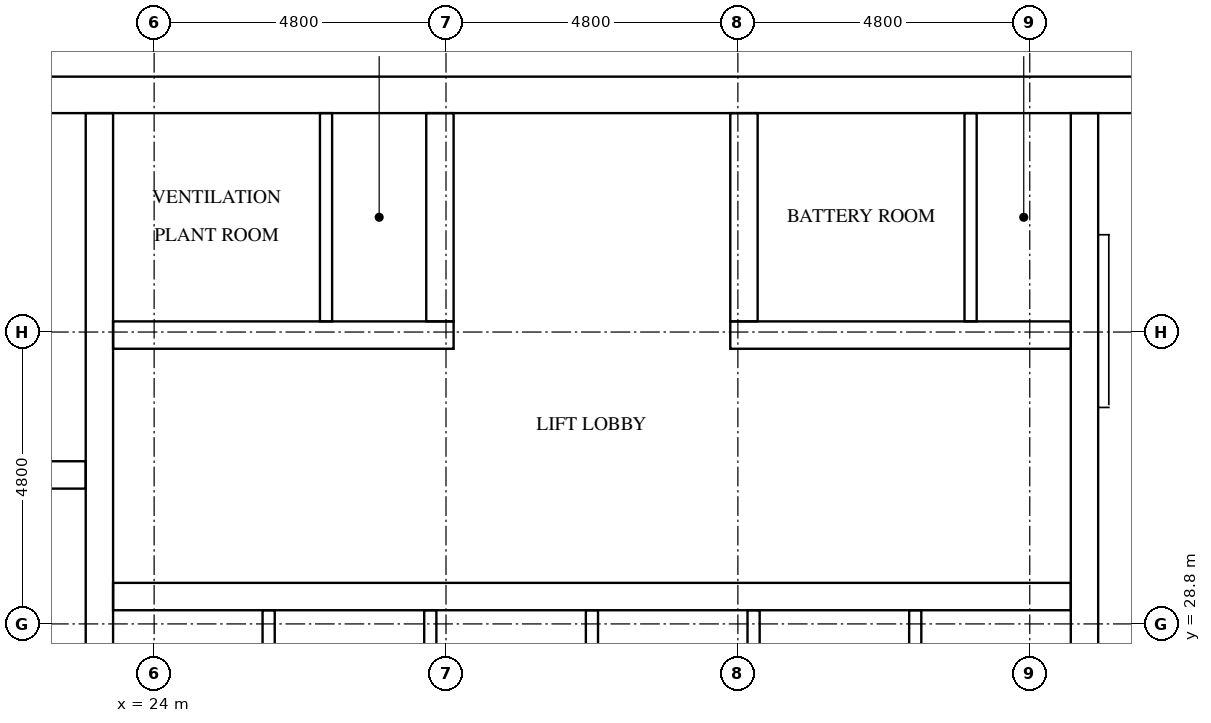
"""IFC4 building model, lengths in metres.
Left out: names, types, materials, properties, quantities, classifications, styles, units other than length and angle.
Written with IfcOpenShell. Run it as: python <this file> out.ifc"""

import sys

from ifc_helpers import new_model, si_unit, direction, frame, frame_2d, origin, place, context, subcontext, project, spatial, rectangle, extrude, element, fill, save


model = new_model("IFC4")
c1 = context("Model", 3, precision=1e-05, world=origin(), true_north=direction((0.0, 1.0)))
c2 = subcontext(c1, "Body", "Model", "MODEL_VIEW")
j1 = project(units=[si_unit("LENGTHUNIT", "METRE"), si_unit("PLANEANGLEUNIT", "RADIAN")], contexts=[c1])
p1 = place(None, origin())
s1 = spatial("IfcSite", under=j1, at=p1, CompositionType="ELEMENT")
p2 = place(p1, origin())
s2 = spatial("IfcBuilding", under=s1, at=p2, CompositionType="ELEMENT")
p3 = place(p2, frame((0.0, 0.0, 249.2)))
s3 = spatial("IfcBuildingStorey", under=s2, at=p3, CompositionType="ELEMENT", Elevation=249.2)
p4 = place(p3, frame((15.0, 37.5, 0.0), z_axis=(0.0, 0.0, 1.0), x_axis=(1.0, 0.0, 0.0)))
e1 = element("IfcWall", 1, at=p4, inside=s3, PredefinedType="SHEAR", context=c2, shape_type="SweptSolid", body=[
    extrude(rectangle(XDim=32.4, YDim=0.6, at=frame_2d((16.2, 0.0))), origin(), (0.0, 0.0, 1.0), 3.2),
])
p5 = place(p4, frame((15.3, 0.0, 0.0)))
e2 = element("IfcOpeningElement", 2, at=p5, cuts=e1, PredefinedType="OPENING", context=c2, shape_type="SweptSolid", body=[
    extrude(rectangle(XDim=1.8, YDim=2.1, at=frame_2d((0.9, 1.05))), frame((0.0, 0.31, 0.0), z_axis=(0.0, -1.0, 0.0), x_axis=(1.0, 0.0, 0.0)), (0.0, 0.0, 1.0), 0.62),
])
p6 = place(p4, frame((1.25, 0.0, 0.0)))
e3 = element("IfcOpeningElement", 3, at=p6, cuts=e1, PredefinedType="OPENING", context=c2, shape_type="SweptSolid", body=[
    extrude(rectangle(XDim=1.0, YDim=2.1, at=frame_2d((0.5, 1.05))), frame((0.0, 0.31, 0.0), z_axis=(0.0, -1.0, 0.0), x_axis=(1.0, 0.0, 0.0)), (0.0, 0.0, 1.0), 0.62),
])
p7 = place(p4, frame((4.988, 0.0, 0.0)))
e4 = element("IfcOpeningElement", 4, at=p7, cuts=e1, PredefinedType="OPENING", context=c2, shape_type="SweptSolid", body=[
    extrude(rectangle(XDim=1.0, YDim=2.1, at=frame_2d((0.5, 1.05))), frame((0.0, 0.31, 0.0), z_axis=(0.0, -1.0, 0.0), x_axis=(1.0, 0.0, 0.0)), (0.0, 0.0, 1.0), 0.62),
])
p8 = place(p3, frame((23.1, 15.6, 0.0), z_axis=(0.0, 0.0, 1.0), x_axis=(0.0, 1.0, 0.0)))
e5 = element("IfcWall", 5, at=p8, inside=s3, PredefinedType="SHEAR", context=c2, shape_type="SweptSolid", body=[
    extrude(rectangle(XDim=21.6, YDim=0.45, at=frame_2d((10.8, 0.0))), origin(), (0.0, 0.0, 1.0), 3.2),
])
p9 = place(p3, frame((39.3, 27.75, 0.0), z_axis=(0.0, 0.0, 1.0), x_axis=(0.0, 1.0, 0.0)))
e6 = element("IfcWall", 6, at=p9, inside=s3, PredefinedType="SHEAR", context=c2, shape_type="SweptSolid", body=[
    extrude(rectangle(XDim=9.45, YDim=0.45, at=frame_2d((4.725, 0.0))), origin(), (0.0, 0.0, 1.0), 3.2),
])
p10 = place(p3, frame((15.6, 31.25, 0.0), z_axis=(0.0, 0.0, 1.0), x_axis=(1.0, 0.0, 0.0)))
e7 = element("IfcWall", 7, at=p10, inside=s3, PredefinedType="SHEAR", context=c2, shape_type="SweptSolid", body=[
    extrude(rectangle(XDim=7.275, YDim=0.45, at=frame_2d((3.637, 0.0))), origin(), (0.0, 0.0, 1.0), 3.2),
])
p11 = place(p3, frame((23.325, 29.25, 0.0), z_axis=(0.0, 0.0, 1.0), x_axis=(1.0, 0.0, 0.0)))
e8 = element("IfcWall", 8, at=p11, inside=s3, PredefinedType="SHEAR", context=c2, shape_type="SweptSolid", body=[
    extrude(rectangle(XDim=15.75, YDim=0.45, at=frame_2d((7.875, 0.0))), origin(), (0.0, 0.0, 1.0), 3.2),
])
p12 = place(p11, frame((0.679, 0.0, 0.0)))
e9 = element("IfcOpeningElement", 9, at=p12, cuts=e8, PredefinedType="OPENING", context=c2, shape_type="SweptSolid", body=[
    extrude(rectangle(XDim=1.1, YDim=2.1, at=frame_2d((0.55, 1.05))), frame((0.0, 0.235, 0.0), z_axis=(0.0, -1.0, 0.0), x_axis=(1.0, 0.0, 0.0)), (0.0, 0.0, 1.0), 0.47),
])
p13 = place(p11, frame((3.337, 0.0, 0.0)))
e10 = element("IfcOpeningElement", 10, at=p13, cuts=e8, PredefinedType="OPENING", context=c2, shape_type="SweptSolid", body=[
    extrude(rectangle(XDim=1.1, YDim=2.1, at=frame_2d((0.55, 1.05))), frame((0.0, 0.235, 0.0), z_axis=(0.0, -1.0, 0.0), x_axis=(1.0, 0.0, 0.0)), (0.0, 0.0, 1.0), 0.47),
])
p14 = place(p11, frame((5.996, 0.0, 0.0)))
e11 = element("IfcOpeningElement", 11, at=p14, cuts=e8, PredefinedType="OPENING", context=c2, shape_type="SweptSolid", body=[
    extrude(rectangle(XDim=1.1, YDim=2.1, at=frame_2d((0.55, 1.05))), frame((0.0, 0.235, 0.0), z_axis=(0.0, -1.0, 0.0), x_axis=(1.0, 0.0, 0.0)), (0.0, 0.0, 1.0), 0.47),
])
p15 = place(p11, frame((8.654, 0.0, 0.0)))
e12 = element("IfcOpeningElement", 12, at=p15, cuts=e8, PredefinedType="OPENING", context=c2, shape_type="SweptSolid", body=[
    extrude(rectangle(XDim=1.1, YDim=2.1, at=frame_2d((0.55, 1.05))), frame((0.0, 0.235, 0.0), z_axis=(0.0, -1.0, 0.0), x_axis=(1.0, 0.0, 0.0)), (0.0, 0.0, 1.0), 0.47),
])
p16 = place(p11, frame((11.312, 0.0, 0.0)))
e13 = element("IfcOpeningElement", 13, at=p16, cuts=e8, PredefinedType="OPENING", context=c2, shape_type="SweptSolid", body=[
    extrude(rectangle(XDim=1.1, YDim=2.1, at=frame_2d((0.55, 1.05))), frame((0.0, 0.235, 0.0), z_axis=(0.0, -1.0, 0.0), x_axis=(1.0, 0.0, 0.0)), (0.0, 0.0, 1.0), 0.47),
])
p17 = place(p11, frame((13.971, 0.0, 0.0)))
e14 = element("IfcOpeningElement", 14, at=p17, cuts=e8, PredefinedType="OPENING", context=c2, shape_type="SweptSolid", body=[
    extrude(rectangle(XDim=1.1, YDim=2.1, at=frame_2d((0.55, 1.05))), frame((0.0, 0.235, 0.0), z_axis=(0.0, -1.0, 0.0), x_axis=(1.0, 0.0, 0.0)), (0.0, 0.0, 1.0), 0.47),
])
p18 = place(p3, frame((23.325, 33.55, 0.0), z_axis=(0.0, 0.0, 1.0), x_axis=(1.0, 0.0, 0.0)))
e15 = element("IfcWall", 15, at=p18, inside=s3, PredefinedType="SHEAR", context=c2, shape_type="SweptSolid", body=[
    extrude(rectangle(XDim=5.6, YDim=0.45, at=frame_2d((2.8, 0.0))), origin(), (0.0, 0.0, 1.0), 3.2),
])
p19 = place(p18, frame((1.201, 0.0, 0.0)))
e16 = element("IfcOpeningElement", 16, at=p19, cuts=e15, PredefinedType="OPENING", context=c2, shape_type="SweptSolid", body=[
    extrude(rectangle(XDim=1.0, YDim=2.1, at=frame_2d((0.5, 1.05))), frame((0.0, 0.235, 0.0), z_axis=(0.0, -1.0, 0.0), x_axis=(1.0, 0.0, 0.0)), (0.0, 0.0, 1.0), 0.47),
])
p20 = place(p18, frame((3.876, 0.0, 0.0)))
e17 = element("IfcOpeningElement", 17, at=p20, cuts=e15, PredefinedType="OPENING", context=c2, shape_type="SweptSolid", body=[
    extrude(rectangle(XDim=1.0, YDim=2.1, at=frame_2d((0.5, 1.05))), frame((0.0, 0.235, 0.0), z_axis=(0.0, -1.0, 0.0), x_axis=(1.0, 0.0, 0.0)), (0.0, 0.0, 1.0), 0.47),
])
p21 = place(p3, frame((33.475, 33.55, 0.0), z_axis=(0.0, 0.0, 1.0), x_axis=(1.0, 0.0, 0.0)))
e18 = element("IfcWall", 18, at=p21, inside=s3, PredefinedType="SHEAR", context=c2, shape_type="SweptSolid", body=[
    extrude(rectangle(XDim=5.6, YDim=0.45, at=frame_2d((2.8, 0.0))), origin(), (0.0, 0.0, 1.0), 3.2),
])
p22 = place(p21, frame((1.651, 0.0, 0.0)))
e19 = element("IfcOpeningElement", 19, at=p22, cuts=e18, PredefinedType="OPENING", context=c2, shape_type="SweptSolid", body=[
    extrude(rectangle(XDim=1.0, YDim=2.1, at=frame_2d((0.5, 1.05))), frame((0.0, 0.235, 0.0), z_axis=(0.0, -1.0, 0.0), x_axis=(1.0, 0.0, 0.0)), (0.0, 0.0, 1.0), 0.47),
])
p23 = place(p21, frame((4.326, 0.0, 0.0)))
e20 = element("IfcOpeningElement", 20, at=p23, cuts=e18, PredefinedType="OPENING", context=c2, shape_type="SweptSolid", body=[
    extrude(rectangle(XDim=1.0, YDim=2.1, at=frame_2d((0.5, 1.05))), frame((0.0, 0.235, 0.0), z_axis=(0.0, -1.0, 0.0), x_axis=(1.0, 0.0, 0.0)), (0.0, 0.0, 1.0), 0.47),
])
for number, where, z_axis, x_axis in (
    (21, (28.7, 33.775, 0.0), (0.0, 0.0, 1.0), (0.0, 1.0, 0.0)),
    (22, (33.7, 33.775, 0.0), (0.0, 0.0, 1.0), (0.0, 1.0, 0.0)),
):
    element("IfcWall", number, at=place(p3, frame(where, z_axis=z_axis, x_axis=x_axis)), inside=s3, PredefinedType="SHEAR", context=c2, shape_type="SweptSolid", body=[
        extrude(rectangle(XDim=3.425, YDim=0.45, at=frame_2d((1.712, 0.0))), origin(), (0.0, 0.0, 1.0), 3.2),
    ])
for number, where, z_axis, x_axis in (
    (23, (25.883, 26.375, 0.0), (0.0, 0.0, 1.0), (0.0, 1.0, 0.0)),
    (24, (28.542, 26.375, 0.0), (0.0, 0.0, 1.0), (0.0, 1.0, 0.0)),
    (25, (31.2, 26.375, 0.0), (0.0, 0.0, 1.0), (0.0, 1.0, 0.0)),
    (26, (33.858, 26.375, 0.0), (0.0, 0.0, 1.0), (0.0, 1.0, 0.0)),
    (27, (36.517, 26.375, 0.0), (0.0, 0.0, 1.0), (0.0, 1.0, 0.0)),
):
    element("IfcWall", number, at=place(p3, frame(where, z_axis=z_axis, x_axis=x_axis)), inside=s3, PredefinedType="SOLIDWALL", context=c2, shape_type="SweptSolid", body=[
        extrude(rectangle(XDim=2.65, YDim=0.2, at=frame_2d((1.325, 0.0))), origin(), (0.0, 0.0, 1.0), 3.2),
    ])
for number, where, z_axis, x_axis in (
    (28, (26.827, 33.775, 0.0), (0.0, 0.0, 1.0), (0.0, 1.0, 0.0)),
    (29, (37.427, 33.775, 0.0), (0.0, 0.0, 1.0), (0.0, 1.0, 0.0)),
):
    element("IfcWall", number, at=place(p3, frame(where, z_axis=z_axis, x_axis=x_axis)), inside=s3, PredefinedType="PARTITIONING", context=c2, shape_type="SweptSolid", body=[
        extrude(rectangle(XDim=3.425, YDim=0.2, at=frame_2d((1.712, 0.0))), origin(), (0.0, 0.0, 1.0), 3.2),
    ])
p24 = place(p12, origin())
e30 = element("IfcDoor", 30, at=p24, inside=s3, OperationType="DOUBLE_DOOR_SLIDING", PredefinedType="DOOR", context=c2, shape_type="SweptSolid", body=[
    extrude(rectangle(XDim=1.1, YDim=2.1, at=frame_2d((0.55, 1.05))), frame((0.0, 0.025, 0.0), z_axis=(0.0, -1.0, 0.0), x_axis=(1.0, 0.0, 0.0)), (0.0, 0.0, 1.0), 0.05),
])
fill(e9, e30)
p25 = place(p13, origin())
e31 = element("IfcDoor", 31, at=p25, inside=s3, OperationType="DOUBLE_DOOR_SLIDING", PredefinedType="DOOR", context=c2, shape_type="SweptSolid", body=[
    extrude(rectangle(XDim=1.1, YDim=2.1, at=frame_2d((0.55, 1.05))), frame((0.0, 0.025, 0.0), z_axis=(0.0, -1.0, 0.0), x_axis=(1.0, 0.0, 0.0)), (0.0, 0.0, 1.0), 0.05),
])
fill(e10, e31)
p26 = place(p14, origin())
e32 = element("IfcDoor", 32, at=p26, inside=s3, OperationType="DOUBLE_DOOR_SLIDING", PredefinedType="DOOR", context=c2, shape_type="SweptSolid", body=[
    extrude(rectangle(XDim=1.1, YDim=2.1, at=frame_2d((0.55, 1.05))), frame((0.0, 0.025, 0.0), z_axis=(0.0, -1.0, 0.0), x_axis=(1.0, 0.0, 0.0)), (0.0, 0.0, 1.0), 0.05),
])
fill(e11, e32)
p27 = place(p15, origin())
e33 = element("IfcDoor", 33, at=p27, inside=s3, OperationType="DOUBLE_DOOR_SLIDING", PredefinedType="DOOR", context=c2, shape_type="SweptSolid", body=[
    extrude(rectangle(XDim=1.1, YDim=2.1, at=frame_2d((0.55, 1.05))), frame((0.0, 0.025, 0.0), z_axis=(0.0, -1.0, 0.0), x_axis=(1.0, 0.0, 0.0)), (0.0, 0.0, 1.0), 0.05),
])
fill(e12, e33)
p28 = place(p16, origin())
e34 = element("IfcDoor", 34, at=p28, inside=s3, OperationType="DOUBLE_DOOR_SLIDING", PredefinedType="DOOR", context=c2, shape_type="SweptSolid", body=[
    extrude(rectangle(XDim=1.1, YDim=2.1, at=frame_2d((0.55, 1.05))), frame((0.0, 0.025, 0.0), z_axis=(0.0, -1.0, 0.0), x_axis=(1.0, 0.0, 0.0)), (0.0, 0.0, 1.0), 0.05),
])
fill(e13, e34)
p29 = place(p17, origin())
e35 = element("IfcDoor", 35, at=p29, inside=s3, OperationType="DOUBLE_DOOR_SLIDING", PredefinedType="DOOR", context=c2, shape_type="SweptSolid", body=[
    extrude(rectangle(XDim=1.1, YDim=2.1, at=frame_2d((0.55, 1.05))), frame((0.0, 0.025, 0.0), z_axis=(0.0, -1.0, 0.0), x_axis=(1.0, 0.0, 0.0)), (0.0, 0.0, 1.0), 0.05),
])
fill(e14, e35)
p30 = place(p5, origin())
e36 = element("IfcDoor", 36, at=p30, inside=s3, OperationType="DOUBLE_DOOR_SINGLE_SWING", PredefinedType="DOOR", context=c2, shape_type="SweptSolid", body=[
    extrude(rectangle(XDim=1.8, YDim=2.1, at=frame_2d((0.9, 1.05))), frame((0.0, 0.025, 0.0), z_axis=(0.0, -1.0, 0.0), x_axis=(1.0, 0.0, 0.0)), (0.0, 0.0, 1.0), 0.05),
])
fill(e2, e36)
p31 = place(p19, frame((1.0, 0.0, 0.0), z_axis=(0.0, 0.0, 1.0), x_axis=(-1.0, 0.0, 0.0)))
e37 = element("IfcDoor", 37, at=p31, inside=s3, OperationType="SINGLE_SWING_LEFT", PredefinedType="DOOR", context=c2, shape_type="SweptSolid", body=[
    extrude(rectangle(XDim=1.0, YDim=2.1, at=frame_2d((0.5, 1.05))), frame((0.0, 0.025, 0.0), z_axis=(0.0, -1.0, 0.0), x_axis=(1.0, 0.0, 0.0)), (0.0, 0.0, 1.0), 0.05),
])
fill(e16, e37)
p32 = place(p20, frame((1.0, 0.0, 0.0), z_axis=(0.0, 0.0, 1.0), x_axis=(-1.0, 0.0, 0.0)))
e38 = element("IfcDoor", 38, at=p32, inside=s3, OperationType="SINGLE_SWING_RIGHT", PredefinedType="DOOR", context=c2, shape_type="SweptSolid", body=[
    extrude(rectangle(XDim=1.0, YDim=2.1, at=frame_2d((0.5, 1.05))), frame((0.0, 0.025, 0.0), z_axis=(0.0, -1.0, 0.0), x_axis=(1.0, 0.0, 0.0)), (0.0, 0.0, 1.0), 0.05),
])
fill(e17, e38)
p33 = place(p22, frame((1.0, 0.0, 0.0), z_axis=(0.0, 0.0, 1.0), x_axis=(-1.0, 0.0, 0.0)))
e39 = element("IfcDoor", 39, at=p33, inside=s3, OperationType="SINGLE_SWING_LEFT", PredefinedType="DOOR", context=c2, shape_type="SweptSolid", body=[
    extrude(rectangle(XDim=1.0, YDim=2.1, at=frame_2d((0.5, 1.05))), frame((0.0, 0.025, 0.0), z_axis=(0.0, -1.0, 0.0), x_axis=(1.0, 0.0, 0.0)), (0.0, 0.0, 1.0), 0.05),
])
fill(e19, e39)
p34 = place(p23, frame((1.0, 0.0, 0.0), z_axis=(0.0, 0.0, 1.0), x_axis=(-1.0, 0.0, 0.0)))
e40 = element("IfcDoor", 40, at=p34, inside=s3, OperationType="SINGLE_SWING_RIGHT", PredefinedType="DOOR", context=c2, shape_type="SweptSolid", body=[
    extrude(rectangle(XDim=1.0, YDim=2.1, at=frame_2d((0.5, 1.05))), frame((0.0, 0.025, 0.0), z_axis=(0.0, -1.0, 0.0), x_axis=(1.0, 0.0, 0.0)), (0.0, 0.0, 1.0), 0.05),
])
fill(e20, e40)
save(model, sys.argv[1])
